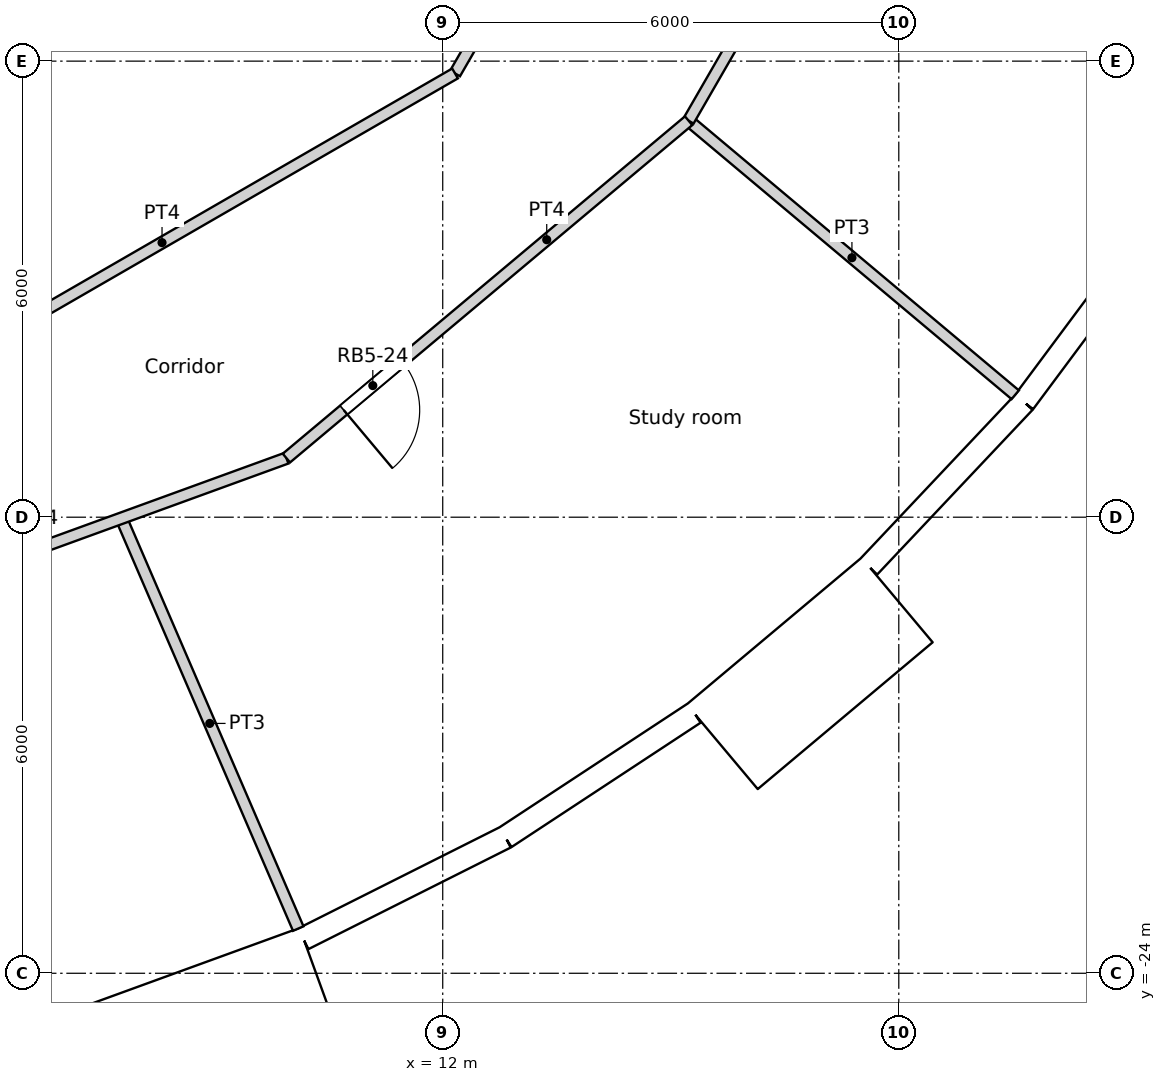
"""IFC4 building model, lengths in metres.
Left out: names, types, materials, properties, quantities, classifications, styles, units other than length and angle.
Written with IfcOpenShell. Run it as: python <this file> out.ifc"""

import sys

from ifc_helpers import new_model, si_unit, direction, frame, frame_2d, origin, origin_2d, place, context, subcontext, project, spatial, rectangle, circle, extrude, element, fill, save


model = new_model("IFC4")
c1 = context("Model", 3, precision=1e-05, world=origin(), true_north=direction((0.0, 1.0)))
c2 = subcontext(c1, "Body", "Model", "MODEL_VIEW")
j1 = project(units=[si_unit("LENGTHUNIT", "METRE"), si_unit("PLANEANGLEUNIT", "RADIAN")], contexts=[c1])
p1 = place(None, origin())
s1 = spatial("IfcSite", under=j1, at=p1, CompositionType="ELEMENT")
p2 = place(p1, origin())
s2 = spatial("IfcBuilding", under=s1, at=p2, CompositionType="ELEMENT")
p3 = place(p2, frame((0.0, 0.0, 169.2)))
s3 = spatial("IfcBuildingStorey", under=s2, at=p3, CompositionType="ELEMENT", Elevation=169.2)
for number, where, z_axis, x_axis in (
    (1, (9.723, -22.54, 0.0), (0.0, 0.0, 1.0), (1.0, 0.0, 0.0)),
    (2, (14.659, -19.69, 0.0), (0.0, 0.0, 1.0), (1.0, 0.0, 0.0)),
    (3, (18.805, -15.779, 0.0), (0.0, 0.0, 1.0), (1.0, 0.0, 0.0)),
):
    element("IfcColumn", number, at=place(p3, frame(where, z_axis=z_axis, x_axis=x_axis)), inside=s3, PredefinedType="COLUMN", context=c2, shape_type="SweptSolid", body=[
        extrude(circle(Radius=0.6, at=origin_2d()), origin(), (0.0, 0.0, 1.0), 3.6),
    ])
for number, where, z_axis, x_axis in (
    (4, (6.876, -17.521, 0.0), (0.0, 0.0, 1.0), (1.0, 0.0, 0.0)),
    (5, (11.735, -14.716, 0.0), (0.0, 0.0, 1.0), (1.0, 0.0, 0.0)),
):
    element("IfcColumn", number, at=place(p3, frame(where, z_axis=z_axis, x_axis=x_axis)), inside=s3, PredefinedType="COLUMN", context=c2, shape_type="SweptSolid", body=[
        extrude(circle(Radius=0.65, at=origin_2d()), origin(), (0.0, 0.0, 1.0), 3.6),
    ])
p4 = place(p3, frame((7.544, -25.113, -0.3), z_axis=(0.0, 0.0, 1.0), x_axis=(0.939686455819, 0.342037080957, 0.0)))
e6 = element("IfcWall", 6, at=p4, inside=s3, PredefinedType="ELEMENTEDWALL", context=c2, shape_type="SweptSolid", body=[
    extrude(rectangle(XDim=3.0, YDim=1.45, at=frame_2d((1.5, 0.0))), origin(), (0.0, 0.0, 1.0), 3.6),
])
p5 = place(p4, frame((1.5, 0.0, 1.85)))
e7 = element("IfcOpeningElement", 7, at=p5, cuts=e6, PredefinedType="OPENING", context=c2, shape_type="SweptSolid", body=[
    extrude(circle(Radius=0.9, at=origin_2d()), frame((0.0, 0.735, 0.0), z_axis=(0.0, -1.0, 0.0), x_axis=(1.0, 0.0, 0.0)), (0.0, 0.0, 1.0), 1.47),
])
p6 = place(p3, frame((10.167, -23.546, 0.0), z_axis=(0.0, 0.0, 1.0), x_axis=(0.893637442555, 0.448789618045, 0.0)))
e8 = element("IfcWall", 8, at=p6, inside=s3, PredefinedType="SOLIDWALL", context=c2, shape_type="SweptSolid", body=[
    extrude(rectangle(XDim=2.973, YDim=0.3, at=frame_2d((1.486, 0.0))), origin(), (0.0, 0.0, 1.0), 3.3),
])
p7 = place(p6, frame((1.486, 0.0, 1.55)))
e9 = element("IfcOpeningElement", 9, at=p7, cuts=e8, PredefinedType="OPENING", context=c2, shape_type="SweptSolid", body=[
    extrude(circle(Radius=0.9, at=origin_2d()), frame((0.0, 0.16, 0.0), z_axis=(0.0, -1.0, 0.0), x_axis=(1.0, 0.0, 0.0)), (0.0, 0.0, 1.0), 0.32),
])
p8 = place(p3, frame((12.824, -22.211, 0.0), z_axis=(0.0, 0.0, 1.0), x_axis=(0.835470659512, 0.549535055382, 0.0)))
e10 = element("IfcWall", 10, at=p8, inside=s3, PredefinedType="SOLIDWALL", context=c2, shape_type="SweptSolid", body=[
    extrude(rectangle(XDim=2.973, YDim=0.3, at=frame_2d((1.487, 0.0))), origin(), (0.0, 0.0, 1.0), 3.3),
])
p9 = place(p8, frame((1.486, 0.0, 1.55)))
e11 = element("IfcOpeningElement", 11, at=p9, cuts=e10, PredefinedType="OPENING", context=c2, shape_type="SweptSolid", body=[
    extrude(circle(Radius=0.9, at=origin_2d()), frame((0.0, 0.16, 0.0), z_axis=(0.0, -1.0, 0.0), x_axis=(1.0, 0.0, 0.0)), (0.0, 0.0, 1.0), 0.32),
])
p10 = place(p3, frame((15.678, -21.019, -0.3), z_axis=(0.0, 0.0, 1.0), x_axis=(0.766022196139, 0.642814121673, 0.0)))
e12 = element("IfcWall", 12, at=p10, inside=s3, PredefinedType="ELEMENTEDWALL", context=c2, shape_type="SweptSolid", body=[
    extrude(rectangle(XDim=3.0, YDim=1.45, at=frame_2d((1.5, 0.0))), origin(), (0.0, 0.0, 1.0), 3.6),
])
p11 = place(p10, frame((1.5, 0.0, 1.85)))
e13 = element("IfcOpeningElement", 13, at=p11, cuts=e12, PredefinedType="OPENING", context=c2, shape_type="SweptSolid", body=[
    extrude(circle(Radius=0.9, at=origin_2d()), frame((0.0, 0.735, 0.0), z_axis=(0.0, -1.0, 0.0), x_axis=(1.0, 0.0, 0.0)), (0.0, 0.0, 1.0), 1.47),
])
p12 = place(p3, frame((17.607, -18.648, 0.0), z_axis=(0.0, 0.0, 1.0), x_axis=(0.686235184166, 0.727379730273, 0.0)))
e14 = element("IfcWall", 14, at=p12, inside=s3, PredefinedType="SOLIDWALL", context=c2, shape_type="SweptSolid", body=[
    extrude(rectangle(XDim=2.973, YDim=0.3, at=frame_2d((1.486, 0.0))), origin(), (0.0, 0.0, 1.0), 3.3),
])
p13 = place(p12, frame((1.486, 0.0, 1.55)))
e15 = element("IfcOpeningElement", 15, at=p13, cuts=e14, PredefinedType="OPENING", context=c2, shape_type="SweptSolid", body=[
    extrude(circle(Radius=0.9, at=origin_2d()), frame((0.0, 0.16, 0.0), z_axis=(0.0, -1.0, 0.0), x_axis=(1.0, 0.0, 0.0)), (0.0, 0.0, 1.0), 0.32),
])
p14 = place(p3, frame((19.647, -16.486, 0.0), z_axis=(0.0, 0.0, 1.0), x_axis=(0.597197580538, 0.80209416517, 0.0)))
e16 = element("IfcWall", 16, at=p14, inside=s3, PredefinedType="SOLIDWALL", context=c2, shape_type="SweptSolid", body=[
    extrude(rectangle(XDim=2.973, YDim=0.3, at=frame_2d((1.486, 0.0))), origin(), (0.0, 0.0, 1.0), 3.3),
])
p15 = place(p14, frame((1.486, 0.0, 1.55)))
e17 = element("IfcOpeningElement", 17, at=p15, cuts=e16, PredefinedType="OPENING", context=c2, shape_type="SweptSolid", body=[
    extrude(circle(Radius=0.9, at=origin_2d()), frame((0.0, 0.16, 0.0), z_axis=(0.0, -1.0, 0.0), x_axis=(1.0, 0.0, 0.0)), (0.0, 0.0, 1.0), 0.32),
])
p16 = place(p3, frame((12.162, -12.162, 0.0), z_axis=(0.0, 0.0, 1.0), x_axis=(0.499961633463, 0.866047553582, 0.0)))
e18 = element("IfcWall", 18, at=p16, inside=s3, PredefinedType="PARTITIONING", context=c2, shape_type="SweptSolid", body=[
    extrude(rectangle(XDim=2.15, YDim=0.15, at=frame_2d((1.075, 0.0))), origin(), (0.0, 0.0, 1.0), 3.3),
])
p17 = place(p3, frame((9.943, -17.222, 0.0), z_axis=(0.0, 0.0, 1.0), x_axis=(0.766192104565, 0.642611592567, 0.0)))
e19 = element("IfcWall", 19, at=p17, inside=s3, PredefinedType="PARTITIONING", context=c2, shape_type="SweptSolid", body=[
    extrude(rectangle(XDim=6.906, YDim=0.15, at=frame_2d((3.453, 0.0))), origin(), (0.0, 0.0, 1.0), 3.3),
])
p18 = place(p17, frame((0.984, 0.0, 0.0)))
e20 = element("IfcOpeningElement", 20, at=p18, cuts=e19, PredefinedType="OPENING", context=c2, shape_type="SweptSolid", body=[
    extrude(rectangle(XDim=1.0, YDim=2.04, at=frame_2d((0.5, 1.02))), frame((0.0, 0.075, 0.0), z_axis=(0.0, -1.0, 0.0), x_axis=(1.0, 0.0, 0.0)), (0.0, 0.0, 1.0), 0.15),
])
p19 = place(p3, frame((15.235, -12.784, 0.0), z_axis=(0.0, 0.0, 1.0), x_axis=(0.499914202267, 0.866074933462, 0.0)))
e21 = element("IfcWall", 21, at=p19, inside=s3, PredefinedType="PARTITIONING", context=c2, shape_type="SweptSolid", body=[
    extrude(rectangle(XDim=6.907, YDim=0.15, at=frame_2d((3.454, 0.0))), origin(), (0.0, 0.0, 1.0), 3.3),
])
p20 = place(p19, frame((3.003, 0.0, 0.0)))
e22 = element("IfcOpeningElement", 22, at=p20, cuts=e21, PredefinedType="OPENING", context=c2, shape_type="SweptSolid", body=[
    extrude(rectangle(XDim=1.8, YDim=2.1, at=frame_2d((0.9, 1.05))), frame((0.0, 0.075, 0.0), z_axis=(0.0, -1.0, 0.0), x_axis=(1.0, 0.0, 0.0)), (0.0, 0.0, 1.0), 0.15),
])
p21 = place(p3, frame((4.452, -16.614, 0.0), z_axis=(0.0, 0.0, 1.0), x_axis=(0.866005203721, 0.500034985904, 0.0)))
e23 = element("IfcWall", 23, at=p21, inside=s3, PredefinedType="PARTITIONING", context=c2, shape_type="SweptSolid", body=[
    extrude(rectangle(XDim=8.903, YDim=0.15, at=frame_2d((4.452, 0.0))), origin(), (0.0, 0.0, 1.0), 3.3),
])
p22 = place(p3, frame((3.453, -19.586, 0.0), z_axis=(0.0, 0.0, 1.0), x_axis=(0.939695353595, 0.342012634901, 0.0)))
e24 = element("IfcWall", 24, at=p22, inside=s3, PredefinedType="PARTITIONING", context=c2, shape_type="SweptSolid", body=[
    extrude(rectangle(XDim=6.908, YDim=0.15, at=frame_2d((3.454, 0.0))), origin(), (0.0, 0.0, 1.0), 3.3),
])
p23 = place(p3, frame((7.771, -18.014, 0.0), z_axis=(0.0, 0.0, 1.0), x_axis=(0.39601833725, -0.918242602236, 0.0)))
e25 = element("IfcWall", 25, at=p23, inside=s3, PredefinedType="PARTITIONING", context=c2, shape_type="SweptSolid", body=[
    extrude(rectangle(XDim=5.879, YDim=0.15, at=frame_2d((2.939, 0.0))), origin(), (0.0, 0.0, 1.0), 3.3),
])
p24 = place(p3, frame((15.235, -12.784, 0.0), z_axis=(0.0, 0.0, 1.0), x_axis=(0.76609059793, -0.642732600514, 0.0)))
e26 = element("IfcWall", 26, at=p24, inside=s3, PredefinedType="PARTITIONING", context=c2, shape_type="SweptSolid", body=[
    extrude(rectangle(XDim=5.609, YDim=0.15, at=frame_2d((2.804, 0.0))), origin(), (0.0, 0.0, 1.0), 3.3),
])
p25 = place(p5, origin())
e27 = element("IfcWindow", 27, at=p25, inside=s3, PartitioningType="SINGLE_PANEL", PredefinedType="WINDOW", context=c2, shape_type="SweptSolid", body=[
    extrude(circle(Radius=0.9, at=origin_2d()), frame((0.0, 0.695, 0.0), z_axis=(0.0, -1.0, 0.0), x_axis=(1.0, 0.0, 0.0)), (0.0, 0.0, 1.0), 0.1),
])
fill(e7, e27)
p26 = place(p7, origin())
e28 = element("IfcWindow", 28, at=p26, inside=s3, PartitioningType="SINGLE_PANEL", PredefinedType="WINDOW", context=c2, shape_type="SweptSolid", body=[
    extrude(circle(Radius=0.9, at=origin_2d()), frame((0.0, 0.12, 0.0), z_axis=(0.0, -1.0, 0.0), x_axis=(1.0, 0.0, 0.0)), (0.0, 0.0, 1.0), 0.1),
])
fill(e9, e28)
p27 = place(p9, origin())
e29 = element("IfcWindow", 29, at=p27, inside=s3, PartitioningType="SINGLE_PANEL", PredefinedType="WINDOW", context=c2, shape_type="SweptSolid", body=[
    extrude(circle(Radius=0.9, at=origin_2d()), frame((0.0, 0.12, 0.0), z_axis=(0.0, -1.0, 0.0), x_axis=(1.0, 0.0, 0.0)), (0.0, 0.0, 1.0), 0.1),
])
fill(e11, e29)
p28 = place(p11, origin())
e30 = element("IfcWindow", 30, at=p28, inside=s3, PartitioningType="SINGLE_PANEL", PredefinedType="WINDOW", context=c2, shape_type="SweptSolid", body=[
    extrude(circle(Radius=0.9, at=origin_2d()), frame((0.0, 0.695, 0.0), z_axis=(0.0, -1.0, 0.0), x_axis=(1.0, 0.0, 0.0)), (0.0, 0.0, 1.0), 0.1),
])
fill(e13, e30)
p29 = place(p13, origin())
e31 = element("IfcWindow", 31, at=p29, inside=s3, PartitioningType="SINGLE_PANEL", PredefinedType="WINDOW", context=c2, shape_type="SweptSolid", body=[
    extrude(circle(Radius=0.9, at=origin_2d()), frame((0.0, 0.12, 0.0), z_axis=(0.0, -1.0, 0.0), x_axis=(1.0, 0.0, 0.0)), (0.0, 0.0, 1.0), 0.1),
])
fill(e15, e31)
p30 = place(p15, origin())
e32 = element("IfcWindow", 32, at=p30, inside=s3, PartitioningType="SINGLE_PANEL", PredefinedType="WINDOW", context=c2, shape_type="SweptSolid", body=[
    extrude(circle(Radius=0.9, at=origin_2d()), frame((0.0, 0.12, 0.0), z_axis=(0.0, -1.0, 0.0), x_axis=(1.0, 0.0, 0.0)), (0.0, 0.0, 1.0), 0.1),
])
fill(e17, e32)
p31 = place(p18, origin())
e33 = element("IfcDoor", 33, at=p31, inside=s3, OperationType="SINGLE_SWING_RIGHT", PredefinedType="DOOR", context=c2, shape_type="SweptSolid", body=[
    extrude(rectangle(XDim=1.0, YDim=2.04, at=frame_2d((0.5, 1.02))), frame((0.0, 0.025, 0.0), z_axis=(0.0, -1.0, 0.0), x_axis=(1.0, 0.0, 0.0)), (0.0, 0.0, 1.0), 0.05),
])
fill(e20, e33)
save(model, sys.argv[1])
